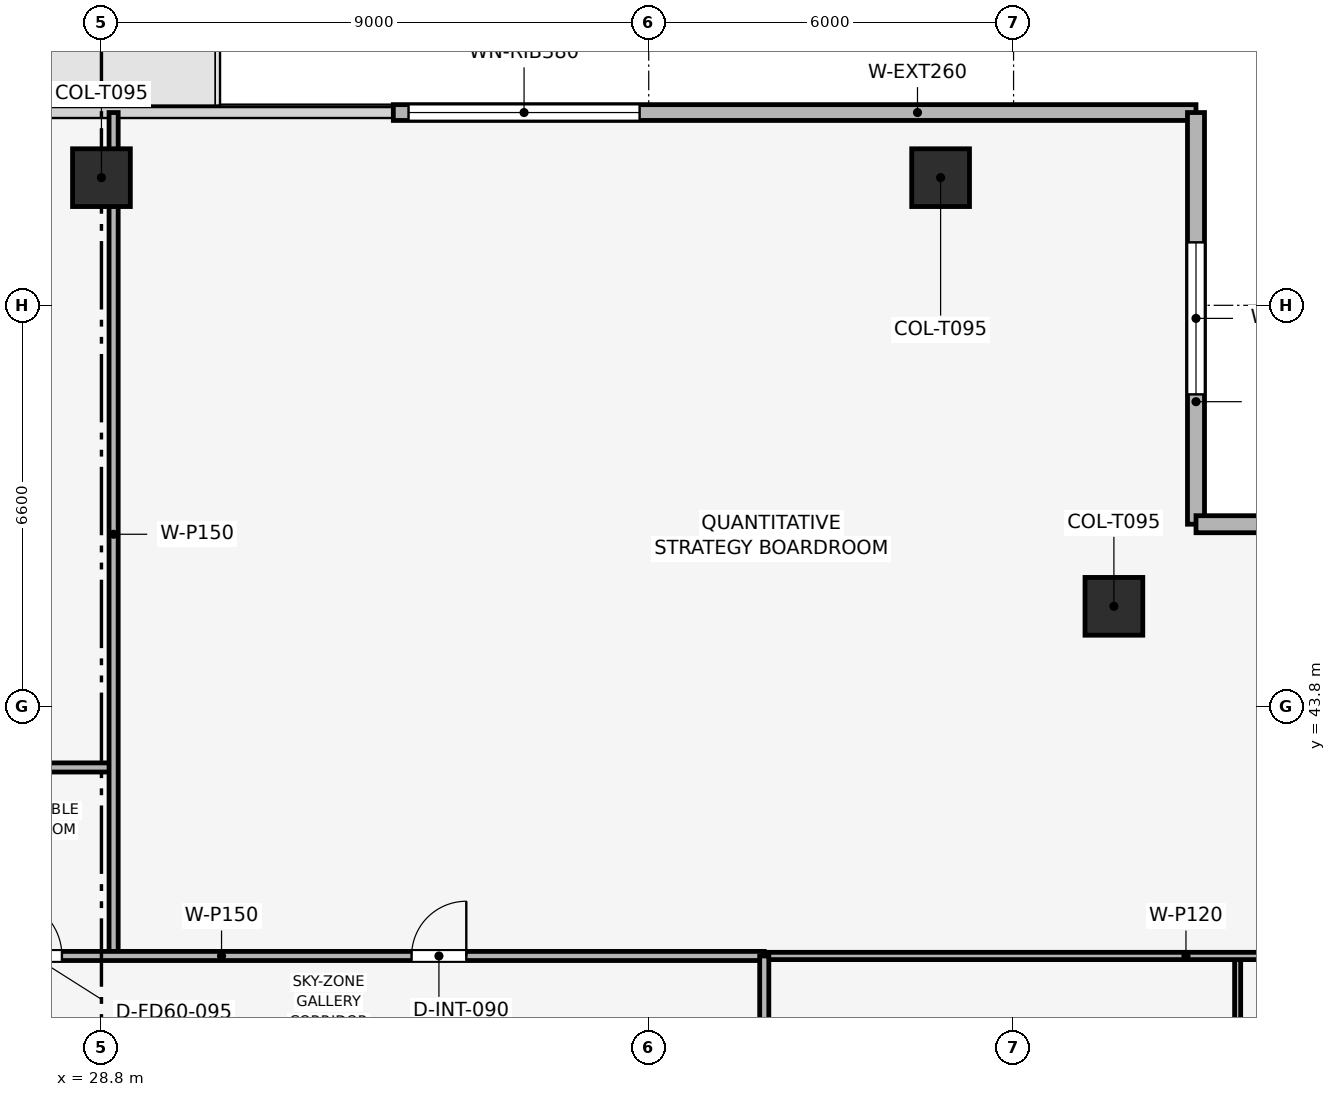
"""IFC4 building model, lengths in metres.
Left out: names, types, materials, properties, quantities, classifications, styles, units other than length and angle.
Written with IfcOpenShell. Run it as: python <this file> out.ifc"""

import sys

from ifc_helpers import new_model, si_unit, direction, frame, frame_2d, origin, origin_2d, place, context, subcontext, project, spatial, rectangle, extrude, element, fill, save


model = new_model("IFC4")
c1 = context("Model", 3, precision=1e-05, world=origin(), true_north=direction((0.0, 1.0)))
c2 = subcontext(c1, "Body", "Model", "MODEL_VIEW")
j1 = project(units=[si_unit("LENGTHUNIT", "METRE"), si_unit("PLANEANGLEUNIT", "RADIAN")], contexts=[c1])
p1 = place(None, origin())
s1 = spatial("IfcSite", under=j1, at=p1, CompositionType="ELEMENT")
p2 = place(p1, origin())
s2 = spatial("IfcBuilding", under=s1, at=p2, CompositionType="ELEMENT")
p3 = place(p2, frame((0.0, 0.0, 280.35)))
s3 = spatial("IfcBuildingStorey", under=s2, at=p3, CompositionType="ELEMENT", Elevation=280.35)
for number, where, z_axis, x_axis in (
    (1, (42.6, 52.499, 0.003), (0.0, -0.233, 0.972), (1.0, 0.0, 0.0)),
    (2, (28.8, 52.499, 0.003), (0.0, -0.233, 0.972), (1.0, 0.0, 0.0)),
):
    element("IfcColumn", number, at=place(p3, frame(where, z_axis=z_axis, x_axis=x_axis)), inside=s3, PredefinedType="COLUMN", context=c2, shape_type="SweptSolid", body=[
        extrude(rectangle(XDim=0.95, YDim=0.95, at=origin_2d()), origin(), (0.0, 0.0, 1.0), 3.48),
    ])
p4 = place(p3, frame((45.45, 45.45, 0.003), z_axis=(-0.156204794595, -0.156204794595, 0.975294890939), x_axis=(0.707106781187, -0.707106781187, 0.0)))
e3 = element("IfcColumn", 3, at=p4, inside=s3, PredefinedType="COLUMN", context=c2, shape_type="SweptSolid", body=[
    extrude(rectangle(XDim=0.95, YDim=0.95, at=origin_2d()), origin(), (0.0, 0.0, 1.0), 3.47),
])
p5 = place(p3, frame((33.6, 53.57, 0.0), z_axis=(0.0, 0.0, 1.0), x_axis=(1.0, 0.0, 0.0)))
e4 = element("IfcWall", 4, at=p5, inside=s3, PredefinedType="SOLIDWALL", context=c2, shape_type="SweptSolid", body=[
    extrude(rectangle(XDim=13.2, YDim=0.26, at=frame_2d((6.6, 0.0))), origin(), (0.0, 0.0, 1.0), 3.39),
])
p6 = place(p5, frame((0.25, 0.0, 0.72)))
e5 = element("IfcOpeningElement", 5, at=p6, cuts=e4, PredefinedType="OPENING", context=c2, shape_type="SweptSolid", body=[
    extrude(rectangle(XDim=3.8, YDim=1.9, at=frame_2d((1.9, 0.95))), frame((0.0, 0.14, 0.0), z_axis=(0.0, -1.0, 0.0), x_axis=(1.0, 0.0, 0.0)), (0.0, 0.0, 1.0), 0.28),
])
p7 = place(p3, frame((46.8, 53.57, 0.0), z_axis=(0.0, 0.0, 1.0), x_axis=(0.0, -1.0, 0.0)))
e6 = element("IfcWall", 6, at=p7, inside=s3, PredefinedType="SOLIDWALL", context=c2, shape_type="SweptSolid", body=[
    extrude(rectangle(XDim=6.77, YDim=0.28, at=frame_2d((3.385, 0.0))), origin(), (0.0, 0.0, 1.0), 3.39),
])
p8 = place(p7, frame((2.135, 0.0, 0.72)))
e7 = element("IfcOpeningElement", 7, at=p8, cuts=e6, PredefinedType="OPENING", context=c2, shape_type="SweptSolid", body=[
    extrude(rectangle(XDim=2.5, YDim=1.9, at=frame_2d((1.25, 0.95))), frame((0.0, 0.15, 0.0), z_axis=(0.0, -1.0, 0.0), x_axis=(1.0, 0.0, 0.0)), (0.0, 0.0, 1.0), 0.3),
])
p9 = place(p3, frame((46.8, 46.8, 0.0), z_axis=(0.0, 0.0, 1.0), x_axis=(1.0, 0.0, 0.0)))
e8 = element("IfcWall", 8, at=p9, inside=s3, PredefinedType="SOLIDWALL", context=c2, shape_type="SweptSolid", body=[
    extrude(rectangle(XDim=6.77, YDim=0.28, at=frame_2d((3.385, 0.0))), origin(), (0.0, 0.0, 1.0), 3.39),
])
p10 = place(p9, frame((2.135, 0.0, 0.72)))
e9 = element("IfcOpeningElement", 9, at=p10, cuts=e8, PredefinedType="OPENING", context=c2, shape_type="SweptSolid", body=[
    extrude(rectangle(XDim=2.5, YDim=1.9, at=frame_2d((1.25, 0.95))), frame((0.0, 0.15, 0.0), z_axis=(0.0, -1.0, 0.0), x_axis=(1.0, 0.0, 0.0)), (0.0, 0.0, 1.0), 0.3),
])
p11 = place(p3, frame((20.6, 42.8, 0.0), z_axis=(0.0, 0.0, 1.0), x_axis=(1.0, 0.0, 0.0)))
e10 = element("IfcWall", 10, at=p11, inside=s3, PredefinedType="PARTITIONING", context=c2, shape_type="SweptSolid", body=[
    extrude(rectangle(XDim=8.4, YDim=0.15, at=frame_2d((4.2, 0.0))), origin(), (0.0, 0.0, 1.0), 2.975),
])
p12 = place(p3, frame((29.0, 39.7, 0.0), z_axis=(0.0, 0.0, 1.0), x_axis=(0.0, 1.0, 0.0)))
e11 = element("IfcWall", 11, at=p12, inside=s3, PredefinedType="PARTITIONING", context=c2, shape_type="SweptSolid", body=[
    extrude(rectangle(XDim=13.87, YDim=0.15, at=frame_2d((6.935, 0.0))), origin(), (0.0, 0.0, 1.0), 2.975),
])
p13 = place(p3, frame((47.485, 31.282, 0.0), z_axis=(0.0, 0.0, 1.0), x_axis=(0.0, 1.0, 0.0)))
e12 = element("IfcWall", 12, at=p13, inside=s3, PredefinedType="MOVABLE", context=c2, shape_type="SweptSolid", body=[
    extrude(rectangle(XDim=8.418, YDim=0.1, at=frame_2d((4.209, 0.0))), origin(), (0.0, 0.0, 1.0), 2.975),
])
p14 = place(p13, frame((4.056, 0.0, 0.0)))
e13 = element("IfcOpeningElement", 13, at=p14, cuts=e12, PredefinedType="OPENING", context=c2, shape_type="SweptSolid", body=[
    extrude(rectangle(XDim=0.9, YDim=2.1, at=frame_2d((0.45, 1.05))), frame((0.0, 0.06, 0.0), z_axis=(0.0, -1.0, 0.0), x_axis=(1.0, 0.0, 0.0)), (0.0, 0.0, 1.0), 0.12),
])
p15 = place(p3, frame((39.7, 39.7, 0.0), z_axis=(0.0, 0.0, 1.0), x_axis=(1.0, 0.0, 0.0)))
e14 = element("IfcWall", 14, at=p15, inside=s3, PredefinedType="PARTITIONING", context=c2, shape_type="SweptSolid", body=[
    extrude(rectangle(XDim=13.87, YDim=0.12, at=frame_2d((6.935, 0.0))), origin(), (0.0, 0.0, 1.0), 2.975),
])
p16 = place(p3, frame((17.9, 39.7, 0.0), z_axis=(0.0, 0.0, 1.0), x_axis=(1.0, 0.0, 0.0)))
e15 = element("IfcWall", 15, at=p16, inside=s3, PredefinedType="PARTITIONING", context=c2, shape_type="SweptSolid", body=[
    extrude(rectangle(XDim=21.8, YDim=0.15, at=frame_2d((10.9, 0.0))), origin(), (0.0, 0.0, 1.0), 2.975),
])
p17 = place(p16, frame((0.9, 0.0, 0.0)))
e16 = element("IfcOpeningElement", 16, at=p17, cuts=e15, PredefinedType="OPENING", context=c2, shape_type="SweptSolid", body=[
    extrude(rectangle(XDim=0.9, YDim=2.1, at=frame_2d((0.45, 1.05))), frame((0.0, 0.085, 0.0), z_axis=(0.0, -1.0, 0.0), x_axis=(1.0, 0.0, 0.0)), (0.0, 0.0, 1.0), 0.17),
])
p18 = place(p16, frame((3.65, 0.0, 0.0)))
e17 = element("IfcOpeningElement", 17, at=p18, cuts=e15, PredefinedType="OPENING", context=c2, shape_type="SweptSolid", body=[
    extrude(rectangle(XDim=0.9, YDim=2.1, at=frame_2d((0.45, 1.05))), frame((0.0, 0.085, 0.0), z_axis=(0.0, -1.0, 0.0), x_axis=(1.0, 0.0, 0.0)), (0.0, 0.0, 1.0), 0.17),
])
p19 = place(p16, frame((6.55, 0.0, 0.0)))
e18 = element("IfcOpeningElement", 18, at=p19, cuts=e15, PredefinedType="OPENING", context=c2, shape_type="SweptSolid", body=[
    extrude(rectangle(XDim=0.9, YDim=2.1, at=frame_2d((0.45, 1.05))), frame((0.0, 0.085, 0.0), z_axis=(0.0, -1.0, 0.0), x_axis=(1.0, 0.0, 0.0)), (0.0, 0.0, 1.0), 0.17),
])
p20 = place(p16, frame((9.3, 0.0, 0.0)))
e19 = element("IfcOpeningElement", 19, at=p20, cuts=e15, PredefinedType="OPENING", context=c2, shape_type="SweptSolid", body=[
    extrude(rectangle(XDim=0.95, YDim=2.1, at=frame_2d((0.475, 1.05))), frame((0.0, 0.085, 0.0), z_axis=(0.0, -1.0, 0.0), x_axis=(1.0, 0.0, 0.0)), (0.0, 0.0, 1.0), 0.17),
])
p21 = place(p16, frame((16.0, 0.0, 0.0)))
e20 = element("IfcOpeningElement", 20, at=p21, cuts=e15, PredefinedType="OPENING", context=c2, shape_type="SweptSolid", body=[
    extrude(rectangle(XDim=0.9, YDim=2.1, at=frame_2d((0.45, 1.05))), frame((0.0, 0.085, 0.0), z_axis=(0.0, -1.0, 0.0), x_axis=(1.0, 0.0, 0.0)), (0.0, 0.0, 1.0), 0.17),
])
p22 = place(p3, frame((39.7, 24.4, 0.0), z_axis=(0.0, 0.0, 1.0), x_axis=(0.0, 1.0, 0.0)))
e21 = element("IfcWall", 21, at=p22, inside=s3, PredefinedType="PARTITIONING", context=c2, shape_type="SweptSolid", body=[
    extrude(rectangle(XDim=15.3, YDim=0.15, at=frame_2d((7.65, 0.0))), origin(), (0.0, 0.0, 1.0), 2.975),
])
p23 = place(p22, frame((0.7, 0.0, 0.0)))
e22 = element("IfcOpeningElement", 22, at=p23, cuts=e21, PredefinedType="OPENING", context=c2, shape_type="SweptSolid", body=[
    extrude(rectangle(XDim=0.9, YDim=2.1, at=frame_2d((0.45, 1.05))), frame((0.0, 0.085, 0.0), z_axis=(0.0, -1.0, 0.0), x_axis=(1.0, 0.0, 0.0)), (0.0, 0.0, 1.0), 0.17),
])
p24 = place(p22, frame((4.141, 0.0, 0.0)))
e23 = element("IfcOpeningElement", 23, at=p24, cuts=e21, PredefinedType="OPENING", context=c2, shape_type="SweptSolid", body=[
    extrude(rectangle(XDim=0.9, YDim=2.1, at=frame_2d((0.45, 1.05))), frame((0.0, 0.085, 0.0), z_axis=(0.0, -1.0, 0.0), x_axis=(1.0, 0.0, 0.0)), (0.0, 0.0, 1.0), 0.17),
])
p25 = place(p22, frame((10.641, 0.0, 0.0)))
e24 = element("IfcOpeningElement", 24, at=p25, cuts=e21, PredefinedType="OPENING", context=c2, shape_type="SweptSolid", body=[
    extrude(rectangle(XDim=0.9, YDim=2.1, at=frame_2d((0.45, 1.05))), frame((0.0, 0.085, 0.0), z_axis=(0.0, -1.0, 0.0), x_axis=(1.0, 0.0, 0.0)), (0.0, 0.0, 1.0), 0.17),
])
p26 = place(p6, origin())
e25 = element("IfcWindow", 25, at=p26, inside=s3, PartitioningType="SINGLE_PANEL", PredefinedType="WINDOW", context=c2, shape_type="SweptSolid", body=[
    extrude(rectangle(XDim=3.8, YDim=1.9, at=frame_2d((1.9, 0.95))), frame((0.0, 0.03, 0.0), z_axis=(0.0, -1.0, 0.0), x_axis=(1.0, 0.0, 0.0)), (0.0, 0.0, 1.0), 0.06),
])
fill(e5, e25)
p27 = place(p8, origin())
e26 = element("IfcWindow", 26, at=p27, inside=s3, PartitioningType="SINGLE_PANEL", PredefinedType="WINDOW", context=c2, shape_type="SweptSolid", body=[
    extrude(rectangle(XDim=2.5, YDim=1.9, at=frame_2d((1.25, 0.95))), frame((0.0, 0.03, 0.0), z_axis=(0.0, -1.0, 0.0), x_axis=(1.0, 0.0, 0.0)), (0.0, 0.0, 1.0), 0.06),
])
fill(e7, e26)
p28 = place(p20, origin())
e27 = element("IfcDoor", 27, at=p28, inside=s3, OperationType="SINGLE_SWING_LEFT", PredefinedType="DOOR", context=c2, shape_type="SweptSolid", body=[
    extrude(rectangle(XDim=0.95, YDim=2.1, at=frame_2d((0.475, 1.05))), frame((0.0, 0.025, 0.0), z_axis=(0.0, -1.0, 0.0), x_axis=(1.0, 0.0, 0.0)), (0.0, 0.0, 1.0), 0.05),
])
fill(e19, e27)
p29 = place(p21, origin())
e28 = element("IfcDoor", 28, at=p29, inside=s3, OperationType="SINGLE_SWING_RIGHT", PredefinedType="DOOR", context=c2, shape_type="SweptSolid", body=[
    extrude(rectangle(XDim=0.9, YDim=2.1, at=frame_2d((0.45, 1.05))), frame((0.0, 0.025, 0.0), z_axis=(0.0, -1.0, 0.0), x_axis=(1.0, 0.0, 0.0)), (0.0, 0.0, 1.0), 0.05),
])
fill(e20, e28)
save(model, sys.argv[1])
